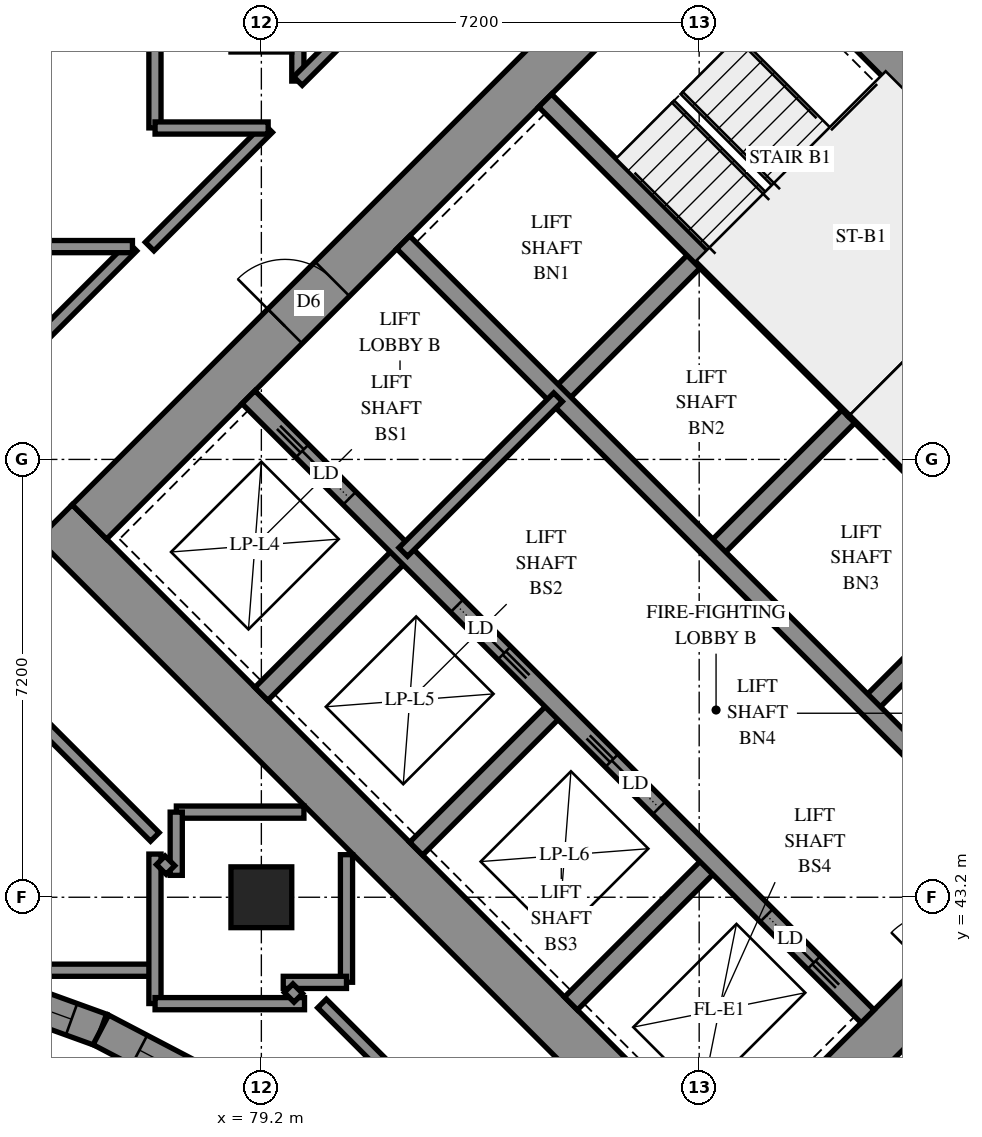
"""IFC4 building model, lengths in metres.
Left out: names, types, materials, properties, quantities, classifications, styles, units other than length and angle.
Written with IfcOpenShell. Run it as: python <this file> out.ifc"""

import sys

from ifc_helpers import new_model, si_unit, direction, frame, frame_2d, origin, origin_2d, place, context, subcontext, project, spatial, polyline, rectangle, outline, extrude, element, fill, save


model = new_model("IFC4")
c1 = context("Model", 3, precision=1e-05, world=origin(), true_north=direction((0.0, 1.0)))
c2 = subcontext(c1, "Body", "Model", "MODEL_VIEW")
j1 = project(units=[si_unit("LENGTHUNIT", "METRE"), si_unit("PLANEANGLEUNIT", "RADIAN")], contexts=[c1])
p1 = place(None, origin())
s1 = spatial("IfcSite", under=j1, at=p1, CompositionType="ELEMENT")
p2 = place(p1, origin())
s2 = spatial("IfcBuilding", under=s1, at=p2, CompositionType="ELEMENT")
p3 = place(p2, frame((0.0, 0.0, 118.6)))
s3 = spatial("IfcBuildingStorey", under=s2, at=p3, CompositionType="ELEMENT", Elevation=118.6)
p4 = place(p3, frame((79.2, 43.2, 0.0), z_axis=(0.0, 0.0, 1.0), x_axis=(1.0, 0.0, 0.0)))
e1 = element("IfcColumn", 1, at=p4, inside=s3, PredefinedType="COLUMN", context=c2, shape_type="SweptSolid", body=[
    extrude(rectangle(XDim=1.0, YDim=1.0, at=origin_2d()), origin(), (0.0, 0.0, 1.0), 3.1),
])
p5 = place(p3, frame((75.806, 49.373, -0.3), z_axis=(0.0, 0.0, 1.0), x_axis=(0.7071067812, -0.7071067812, 0.0)))
e2 = element("IfcWall", 2, at=p5, inside=s3, PredefinedType="SHEAR", context=c2, shape_type="SweptSolid", body=[
    extrude(rectangle(XDim=16.0, YDim=0.8, at=frame_2d((8.0, 0.0))), origin(), (0.0, 0.0, 1.0), 2.7),
])
p6 = place(p3, frame((86.554, 60.121, -0.3), z_axis=(0.0, 0.0, 1.0), x_axis=(0.7071067812, -0.7071067812, 0.0)))
e3 = element("IfcWall", 3, at=p6, inside=s3, PredefinedType="SHEAR", context=c2, shape_type="SweptSolid", body=[
    extrude(rectangle(XDim=16.0, YDim=0.8, at=frame_2d((8.0, 0.0))), origin(), (0.0, 0.0, 1.0), 2.7),
])
p7 = place(p6, frame((10.8, 0.0, 0.3)))
e4 = element("IfcOpeningElement", 4, at=p7, cuts=e3, PredefinedType="OPENING", context=c2, shape_type="SweptSolid", body=[
    extrude(rectangle(XDim=0.8, YDim=2.1, at=frame_2d((0.4, 1.05))), frame((0.0, 0.41, 0.0), z_axis=(0.0, -1.0, 0.0), x_axis=(1.0, 0.0, 0.0)), (0.0, 0.0, 1.0), 0.82),
])
p8 = place(p3, frame((76.372, 49.373, -0.3), z_axis=(0.0, 0.0, 1.0), x_axis=(0.7071067812, 0.7071067812, 0.0)))
e5 = element("IfcWall", 5, at=p8, inside=s3, PredefinedType="SHEAR", context=c2, shape_type="SweptSolid", body=[
    extrude(rectangle(XDim=14.4, YDim=0.8, at=frame_2d((7.2, 0.0))), origin(), (0.0, 0.0, 1.0), 2.7),
])
p9 = place(p8, frame((4.55, 0.0, 0.3)))
e6 = element("IfcOpeningElement", 6, at=p9, cuts=e5, PredefinedType="OPENING", context=c2, shape_type="SweptSolid", body=[
    extrude(rectangle(XDim=1.1, YDim=2.1, at=frame_2d((0.55, 1.05))), frame((0.0, 0.41, 0.0), z_axis=(0.0, -1.0, 0.0), x_axis=(1.0, 0.0, 0.0)), (0.0, 0.0, 1.0), 0.82),
])
p10 = place(p8, frame((11.35, 0.0, 0.3)))
e7 = element("IfcOpeningElement", 7, at=p10, cuts=e5, PredefinedType="OPENING", context=c2, shape_type="SweptSolid", body=[
    extrude(rectangle(XDim=1.1, YDim=2.1, at=frame_2d((0.55, 1.05))), frame((0.0, 0.41, 0.0), z_axis=(0.0, -1.0, 0.0), x_axis=(1.0, 0.0, 0.0)), (0.0, 0.0, 1.0), 0.82),
])
p11 = place(p3, frame((87.12, 38.625, -0.3), z_axis=(0.0, 0.0, 1.0), x_axis=(0.7071067812, 0.7071067812, 0.0)))
e8 = element("IfcWall", 8, at=p11, inside=s3, PredefinedType="SHEAR", context=c2, shape_type="SweptSolid", body=[
    extrude(rectangle(XDim=14.4, YDim=0.8, at=frame_2d((7.2, 0.0))), origin(), (0.0, 0.0, 1.0), 2.7),
])
p12 = place(p11, frame((4.55, 0.0, 0.3)))
e9 = element("IfcOpeningElement", 9, at=p12, cuts=e8, PredefinedType="OPENING", context=c2, shape_type="SweptSolid", body=[
    extrude(rectangle(XDim=1.1, YDim=2.1, at=frame_2d((0.55, 1.05))), frame((0.0, 0.41, 0.0), z_axis=(0.0, -1.0, 0.0), x_axis=(1.0, 0.0, 0.0)), (0.0, 0.0, 1.0), 0.82),
])
p13 = place(p11, frame((11.35, 0.0, 0.3)))
e10 = element("IfcOpeningElement", 10, at=p13, cuts=e8, PredefinedType="OPENING", context=c2, shape_type="SweptSolid", body=[
    extrude(rectangle(XDim=1.1, YDim=2.1, at=frame_2d((0.55, 1.05))), frame((0.0, 0.41, 0.0), z_axis=(0.0, -1.0, 0.0), x_axis=(1.0, 0.0, 0.0)), (0.0, 0.0, 1.0), 0.82),
])
for number, where, z_axis, x_axis in (
    (11, (79.2, 46.544, 0.0), (0.0, 0.0, 1.0), (0.707, 0.707, 0.0)),
    (12, (84.079, 51.423, 0.0), (0.0, 0.0, 1.0), (0.707, 0.707, 0.0)),
):
    element("IfcWall", number, at=place(p3, frame(where, z_axis=z_axis, x_axis=x_axis)), inside=s3, PredefinedType="SOLIDWALL", context=c2, shape_type="SweptSolid", body=[
        extrude(rectangle(XDim=3.3, YDim=0.3, at=frame_2d((1.65, 0.0))), origin(), (0.0, 0.0, 1.0), 3.1),
    ])
p14 = place(p3, frame((81.746, 43.999, 0.0), z_axis=(0.0, 0.0, 1.0), x_axis=(0.7071067812, 0.7071067812, 0.0)))
e13 = element("IfcWall", 13, at=p14, inside=s3, PredefinedType="SOLIDWALL", context=c2, shape_type="SweptSolid", body=[
    extrude(rectangle(XDim=3.3, YDim=0.3, at=frame_2d((1.65, 0.0))), origin(), (0.0, 0.0, 1.0), 3.1),
])
p15 = place(p3, frame((86.625, 48.878, 0.0), z_axis=(0.0, 0.0, 1.0), x_axis=(0.7071067812, 0.7071067812, 0.0)))
e14 = element("IfcWall", 14, at=p15, inside=s3, PredefinedType="SOLIDWALL", context=c2, shape_type="SweptSolid", body=[
    extrude(rectangle(XDim=3.3, YDim=0.3, at=frame_2d((1.65, 0.0))), origin(), (0.0, 0.0, 1.0), 3.1),
])
p16 = place(p3, frame((84.291, 41.453, 0.0), z_axis=(0.0, 0.0, 1.0), x_axis=(0.7071067812, 0.7071067812, 0.0)))
e15 = element("IfcWall", 15, at=p16, inside=s3, PredefinedType="SOLIDWALL", context=c2, shape_type="SweptSolid", body=[
    extrude(rectangle(XDim=3.3, YDim=0.3, at=frame_2d((1.65, 0.0))), origin(), (0.0, 0.0, 1.0), 3.1),
])
p17 = place(p3, frame((89.17, 46.332, 0.0), z_axis=(0.0, 0.0, 1.0), x_axis=(0.7071067812, 0.7071067812, 0.0)))
e16 = element("IfcWall", 16, at=p17, inside=s3, PredefinedType="SOLIDWALL", context=c2, shape_type="SweptSolid", body=[
    extrude(rectangle(XDim=3.3, YDim=0.3, at=frame_2d((1.65, 0.0))), origin(), (0.0, 0.0, 1.0), 3.1),
])
p18 = place(p3, frame((78.988, 51.423, 0.0), z_axis=(0.0, 0.0, 1.0), x_axis=(0.7071067812, -0.7071067812, 0.0)))
e17 = element("IfcWall", 17, at=p18, inside=s3, PredefinedType="SOLIDWALL", context=c2, shape_type="SweptSolid", body=[
    extrude(rectangle(XDim=14.4, YDim=0.3, at=frame_2d((7.2, 0.0))), origin(), (0.0, 0.0, 1.0), 3.1),
])
p19 = place(p18, frame((1.25, 0.0, 0.0)))
e18 = element("IfcOpeningElement", 18, at=p19, cuts=e17, PredefinedType="OPENING", context=c2, shape_type="SweptSolid", body=[
    extrude(rectangle(XDim=1.1, YDim=2.1, at=frame_2d((0.55, 1.05))), frame((0.0, 0.16, 0.0), z_axis=(0.0, -1.0, 0.0), x_axis=(1.0, 0.0, 0.0)), (0.0, 0.0, 1.0), 0.32),
])
p20 = place(p18, frame((4.85, 0.0, 0.0)))
e19 = element("IfcOpeningElement", 19, at=p20, cuts=e17, PredefinedType="OPENING", context=c2, shape_type="SweptSolid", body=[
    extrude(rectangle(XDim=1.1, YDim=2.1, at=frame_2d((0.55, 1.05))), frame((0.0, 0.16, 0.0), z_axis=(0.0, -1.0, 0.0), x_axis=(1.0, 0.0, 0.0)), (0.0, 0.0, 1.0), 0.32),
])
p21 = place(p18, frame((8.45, 0.0, 0.0)))
e20 = element("IfcOpeningElement", 20, at=p21, cuts=e17, PredefinedType="OPENING", context=c2, shape_type="SweptSolid", body=[
    extrude(rectangle(XDim=1.1, YDim=2.1, at=frame_2d((0.55, 1.05))), frame((0.0, 0.16, 0.0), z_axis=(0.0, -1.0, 0.0), x_axis=(1.0, 0.0, 0.0)), (0.0, 0.0, 1.0), 0.32),
])
p22 = place(p18, frame((12.05, 0.0, 0.0)))
e21 = element("IfcOpeningElement", 21, at=p22, cuts=e17, PredefinedType="OPENING", context=c2, shape_type="SweptSolid", body=[
    extrude(rectangle(XDim=1.1, YDim=2.1, at=frame_2d((0.55, 1.05))), frame((0.0, 0.16, 0.0), z_axis=(0.0, -1.0, 0.0), x_axis=(1.0, 0.0, 0.0)), (0.0, 0.0, 1.0), 0.32),
])
p23 = place(p3, frame((81.534, 53.969, 0.0), z_axis=(0.0, 0.0, 1.0), x_axis=(0.707103309, -0.7071102534, 0.0)))
e22 = element("IfcWall", 22, at=p23, inside=s3, PredefinedType="SOLIDWALL", context=c2, shape_type="SweptSolid", body=[
    extrude(rectangle(XDim=14.4, YDim=0.3, at=frame_2d((7.2, 0.0))), origin(), (0.0, 0.0, 1.0), 3.1),
])
p24 = place(p23, frame((12.05, 0.0, 0.0)))
e23 = element("IfcOpeningElement", 23, at=p24, cuts=e22, PredefinedType="OPENING", context=c2, shape_type="SweptSolid", body=[
    extrude(rectangle(XDim=1.1, YDim=2.1, at=frame_2d((0.55, 1.05))), frame((0.0, 0.16, 0.0), z_axis=(0.0, -1.0, 0.0), x_axis=(1.0, 0.0, 0.0)), (0.0, 0.0, 1.0), 0.32),
])
for number, where, z_axis, x_axis in (
    (24, (83.867, 56.302, 0.0), (0.0, 0.0, 1.0), (0.707, -0.707, 0.0)),
    (25, (88.958, 51.211, 0.0), (0.0, 0.0, 1.0), (0.707, -0.707, 0.0)),
):
    element("IfcWall", number, at=place(p3, frame(where, z_axis=z_axis, x_axis=x_axis)), inside=s3, PredefinedType="SOLIDWALL", context=c2, shape_type="SweptSolid", body=[
        extrude(rectangle(XDim=7.2, YDim=0.3, at=frame_2d((3.6, 0.0))), origin(), (0.0, 0.0, 1.0), 3.1),
    ])
p25 = place(p3, frame((88.958, 51.211, 0.0), z_axis=(0.0, 0.0, 1.0), x_axis=(0.7071067812, 0.7071067812, 0.0)))
e26 = element("IfcWall", 26, at=p25, inside=s3, PredefinedType="SOLIDWALL", context=c2, shape_type="SweptSolid", body=[
    extrude(rectangle(XDim=4.2, YDim=0.3, at=frame_2d((2.1, 0.0))), origin(), (0.0, 0.0, 1.0), 3.1),
])
p26 = place(p3, frame((73.067, 42.284, 0.0), z_axis=(0.0, 0.0, 1.0), x_axis=(0.9402976308, -0.3403532953, 0.0)))
e27 = element("IfcWall", 27, at=p26, inside=s3, PredefinedType="SOLIDWALL", context=c2, shape_type="SweptSolid", body=[
    extrude(outline(polyline([(0.075, -0.275), (3.697, -0.275), (3.734, 0.275), (-0.075, 0.275), (0.075, -0.275)])), origin(), (0.0, 0.0, 1.0), 3.1),
])
p27 = place(p26, frame((0.396, 0.0, 0.45)))
e28 = element("IfcOpeningElement", 28, at=p27, cuts=e27, PredefinedType="OPENING", context=c2, shape_type="SweptSolid", body=[
    extrude(rectangle(XDim=1.0, YDim=2.5, at=frame_2d((0.5, 1.25))), frame((0.0, 0.285, 0.0), z_axis=(0.0, -1.0, 0.0), x_axis=(1.0, 0.0, 0.0)), (0.0, 0.0, 1.0), 0.57),
])
p28 = place(p26, frame((2.003, 0.0, 0.5)))
e29 = element("IfcOpeningElement", 29, at=p28, cuts=e27, PredefinedType="OPENING", context=c2, shape_type="SweptSolid", body=[
    extrude(rectangle(XDim=1.2, YDim=2.45, at=frame_2d((0.6, 1.225))), frame((0.0, 0.285, 0.0), z_axis=(0.0, -1.0, 0.0), x_axis=(1.0, 0.0, 0.0)), (0.0, 0.0, 1.0), 0.57),
])
p29 = place(p3, frame((76.561, 41.019, 0.0), z_axis=(0.0, 0.0, 1.0), x_axis=(0.8859460506, -0.4637883089, 0.0)))
e30 = element("IfcWall", 30, at=p29, inside=s3, PredefinedType="SOLIDWALL", context=c2, shape_type="SweptSolid", body=[
    extrude(outline(polyline([(0.019, -0.275), (4.139, -0.275), (4.268, 0.275), (-0.019, 0.275), (0.019, -0.275)])), origin(), (0.0, 0.0, 1.0), 3.1),
])
p30 = place(p29, frame((0.717, 0.0, 0.5)))
e31 = element("IfcOpeningElement", 31, at=p30, cuts=e30, PredefinedType="OPENING", context=c2, shape_type="SweptSolid", body=[
    extrude(rectangle(XDim=1.2, YDim=2.45, at=frame_2d((0.6, 1.225))), frame((0.0, 0.285, 0.0), z_axis=(0.0, -1.0, 0.0), x_axis=(1.0, 0.0, 0.0)), (0.0, 0.0, 1.0), 0.57),
])
p31 = place(p29, frame((2.219, 0.0, 0.5)))
e32 = element("IfcOpeningElement", 32, at=p31, cuts=e30, PredefinedType="OPENING", context=c2, shape_type="SweptSolid", body=[
    extrude(rectangle(XDim=1.2, YDim=2.45, at=frame_2d((0.6, 1.225))), frame((0.0, 0.285, 0.0), z_axis=(0.0, -1.0, 0.0), x_axis=(1.0, 0.0, 0.0)), (0.0, 0.0, 1.0), 0.57),
])
p32 = place(p3, frame((81.534, 48.878, 0.0), z_axis=(0.0, 0.0, 1.0), x_axis=(0.707092892, 0.7071206701, 0.0)))
e33 = element("IfcWall", 33, at=p32, inside=s3, PredefinedType="PARTITIONING", context=c2, shape_type="SweptSolid", body=[
    extrude(rectangle(XDim=3.6, YDim=0.2, at=frame_2d((1.8, 0.0))), origin(), (0.0, 0.0, 1.0), 3.1),
])
p33 = place(p3, frame((86.329, 33.31, 0.0), z_axis=(0.0, 0.0, 1.0), x_axis=(0.7071067812, 0.7071067812, 0.0)))
e34 = element("IfcWall", 34, at=p33, inside=s3, PredefinedType="PARTITIONING", context=c2, shape_type="SweptSolid", body=[
    extrude(rectangle(XDim=11.617, YDim=0.2, at=frame_2d((5.808, 0.0))), origin(), (0.0, 0.0, 1.0), 3.1),
])
p34 = place(p3, frame((86.835, 34.806, 0.0), z_axis=(0.0, 0.0, 1.0), x_axis=(0.7071067812, 0.7071067812, 0.0)))
e35 = element("IfcWall", 35, at=p34, inside=s3, PredefinedType="PARTITIONING", context=c2, shape_type="SweptSolid", body=[
    extrude(rectangle(XDim=10.201, YDim=0.2, at=frame_2d((5.1, 0.0))), origin(), (0.0, 0.0, 1.0), 3.1),
])
p35 = place(p34, frame((8.959, 0.0, 0.0)))
e36 = element("IfcOpeningElement", 36, at=p35, cuts=e35, PredefinedType="OPENING", context=c2, shape_type="SweptSolid", body=[
    extrude(rectangle(XDim=1.0, YDim=2.1, at=frame_2d((0.5, 1.05))), frame((0.0, 0.11, 0.0), z_axis=(0.0, -1.0, 0.0), x_axis=(1.0, 0.0, 0.0)), (0.0, 0.0, 1.0), 0.22),
])
p36 = place(p3, frame((88.889, 61.315, 0.0), z_axis=(0.0, 0.0, 1.0), x_axis=(0.7071067812, -0.7071067812, 0.0)))
e37 = element("IfcWall", 37, at=p36, inside=s3, PredefinedType="PARTITIONING", context=c2, shape_type="SweptSolid", body=[
    extrude(rectangle(XDim=7.187, YDim=0.2, at=frame_2d((3.594, 0.0))), origin(), (0.0, 0.0, 1.0), 3.1),
])
p37 = place(p3, frame((80.197, 41.453, 0.0), z_axis=(0.0, 0.0, 1.0), x_axis=(0.7071067812, -0.7071067812, 0.0)))
e38 = element("IfcWall", 38, at=p37, inside=s3, PredefinedType="PARTITIONING", context=c2, shape_type="SweptSolid", body=[
    extrude(rectangle(XDim=6.488, YDim=0.2, at=frame_2d((3.244, 0.0))), origin(), (0.0, 0.0, 1.0), 3.1),
])
p38 = place(p3, frame((75.102, 51.922, 0.0), z_axis=(0.0, 0.0, 1.0), x_axis=(0.7071067812, 0.7071067812, 0.0)))
e39 = element("IfcWall", 39, at=p38, inside=s3, PredefinedType="PARTITIONING", context=c2, shape_type="SweptSolid", body=[
    extrude(rectangle(XDim=2.797, YDim=0.2, at=frame_2d((1.399, 0.0))), origin(), (0.0, 0.0, 1.0), 3.1),
])
p39 = place(p3, frame((77.45, 55.852, 0.0), z_axis=(0.0, 0.0, 1.0), x_axis=(0.0, 1.0, 0.0)))
e40 = element("IfcWall", 40, at=p39, inside=s3, PredefinedType="PARTITIONING", context=c2, shape_type="SweptSolid", body=[
    extrude(rectangle(XDim=2.766, YDim=0.2, at=frame_2d((1.383, 0.0))), origin(), (0.0, 0.0, 1.0), 3.1),
])
p40 = place(p3, frame((79.8, 56.622, 0.0), z_axis=(0.0, 0.0, 1.0), x_axis=(0.0, 1.0, 0.0)))
e41 = element("IfcWall", 41, at=p40, inside=s3, PredefinedType="PARTITIONING", context=c2, shape_type="SweptSolid", body=[
    extrude(rectangle(XDim=2.758, YDim=0.2, at=frame_2d((1.379, 0.0))), origin(), (0.0, 0.0, 1.0), 3.1),
])
p41 = place(p3, frame((77.363, 53.901, 0.0), z_axis=(0.0, 0.0, 1.0), x_axis=(0.7071067812, 0.7071067812, 0.0)))
e42 = element("IfcWall", 42, at=p41, inside=s3, PredefinedType="PARTITIONING", context=c2, shape_type="SweptSolid", body=[
    extrude(rectangle(XDim=2.755, YDim=0.2, at=frame_2d((1.377, 0.0))), origin(), (0.0, 0.0, 1.0), 3.1),
])
p42 = place(p3, frame((74.709, 42.0, 0.0), z_axis=(0.0, 0.0, 1.0), x_axis=(1.0, 0.0, 0.0)))
e43 = element("IfcWall", 43, at=p42, inside=s3, PredefinedType="PARTITIONING", context=c2, shape_type="SweptSolid", body=[
    extrude(rectangle(XDim=2.741, YDim=0.2, at=frame_2d((1.37, 0.0))), origin(), (0.0, 0.0, 1.0), 3.1),
])
p43 = place(p3, frame((75.598, 46.04, 0.0), z_axis=(0.0, 0.0, 1.0), x_axis=(0.7074891043, -0.7067242512, 0.0)))
e44 = element("IfcWall", 44, at=p43, inside=s3, PredefinedType="PARTITIONING", context=c2, shape_type="SweptSolid", body=[
    extrude(rectangle(XDim=2.615, YDim=0.2, at=frame_2d((1.308, 0.0))), origin(), (0.0, 0.0, 1.0), 3.1),
])
for number, where, z_axis, x_axis in (
    (45, (77.45, 41.452, 0.0), (0.0, 0.0, 1.0), (0.0, 1.0, 0.0)),
    (46, (77.452, 41.45, 0.0), (0.0, 0.0, 1.0), (1.0, 0.0, 0.0)),
):
    element("IfcWall", number, at=place(p3, frame(where, z_axis=z_axis, x_axis=x_axis)), inside=s3, PredefinedType="PARTITIONING", context=c2, shape_type="SweptSolid", body=[
        extrude(rectangle(XDim=2.458, YDim=0.2, at=frame_2d((1.229, 0.0))), origin(), (0.0, 0.0, 1.0), 3.1),
    ])
for number, where, z_axis, x_axis in (
    (47, (77.802, 44.6, 0.0), (0.0, 0.0, 1.0), (1.0, 0.0, 0.0)),
    (48, (80.6, 41.802, 0.0), (0.0, 0.0, 1.0), (0.0, 1.0, 0.0)),
):
    element("IfcWall", number, at=place(p3, frame(where, z_axis=z_axis, x_axis=x_axis)), inside=s3, PredefinedType="PARTITIONING", context=c2, shape_type="SweptSolid", body=[
        extrude(rectangle(XDim=2.098, YDim=0.2, at=frame_2d((1.049, 0.0))), origin(), (0.0, 0.0, 1.0), 3.1),
    ])
p44 = place(p3, frame((75.1, 53.9, 0.0), z_axis=(0.0, 0.0, 1.0), x_axis=(1.0, 0.0, 0.0)))
e49 = element("IfcWall", 49, at=p44, inside=s3, PredefinedType="PARTITIONING", context=c2, shape_type="SweptSolid", body=[
    extrude(rectangle(XDim=1.98, YDim=0.2, at=frame_2d((0.99, 0.0))), origin(), (0.0, 0.0, 1.0), 3.1),
])
p45 = place(p3, frame((79.802, 56.623, 0.0), z_axis=(0.0, 0.0, 1.0), x_axis=(0.7071067812, 0.7071067812, 0.0)))
e50 = element("IfcWall", 50, at=p45, inside=s3, PredefinedType="PARTITIONING", context=c2, shape_type="SweptSolid", body=[
    extrude(rectangle(XDim=1.949, YDim=0.2, at=frame_2d((0.974, 0.0))), origin(), (0.0, 0.0, 1.0), 3.1),
])
p46 = place(p3, frame((77.452, 55.85, 0.0), z_axis=(0.0, 0.0, 1.0), x_axis=(1.0, 0.0, 0.0)))
e51 = element("IfcWall", 51, at=p46, inside=s3, PredefinedType="PARTITIONING", context=c2, shape_type="SweptSolid", body=[
    extrude(rectangle(XDim=1.86, YDim=0.2, at=frame_2d((0.93, 0.0))), origin(), (0.0, 0.0, 1.0), 3.1),
])
for number, where, z_axis, x_axis in (
    (52, (77.8, 43.56, 0.0), (0.0, 0.0, 1.0), (0.0, 1.0, 0.0)),
    (53, (79.56, 41.8, 0.0), (0.0, 0.0, 1.0), (1.0, 0.0, 0.0)),
):
    element("IfcWall", number, at=place(p3, frame(where, z_axis=z_axis, x_axis=x_axis)), inside=s3, PredefinedType="PARTITIONING", context=c2, shape_type="SweptSolid", body=[
        extrude(rectangle(XDim=1.04, YDim=0.2, at=frame_2d((0.52, 0.0))), origin(), (0.0, 0.0, 1.0), 3.1),
    ])
for number, where, z_axis, x_axis in (
    (54, (79.649, 41.705, 0.0), (0.0, 0.0, 1.0), (0.707, -0.707, 0.0)),
    (55, (77.546, 43.808, 0.0), (0.0, 0.0, 1.0), (0.707, -0.707, 0.0)),
):
    element("IfcWall", number, at=place(p3, frame(where, z_axis=z_axis, x_axis=x_axis)), inside=s3, PredefinedType="PARTITIONING", context=c2, shape_type="SweptSolid", body=[
        extrude(rectangle(XDim=0.225, YDim=0.2, at=frame_2d((0.112, 0.0))), origin(), (0.0, 0.0, 1.0), 3.1),
    ])
p47 = place(p30, origin())
e56 = element("IfcWindow", 56, at=p47, inside=s3, PartitioningType="SINGLE_PANEL", PredefinedType="WINDOW", context=c2, shape_type="SweptSolid", body=[
    extrude(rectangle(XDim=1.2, YDim=2.45, at=frame_2d((0.6, 1.225))), frame((0.0, 0.155, 0.0), z_axis=(0.0, -1.0, 0.0), x_axis=(1.0, 0.0, 0.0)), (0.0, 0.0, 1.0), 0.06),
])
fill(e31, e56)
p48 = place(p9, origin())
e57 = element("IfcDoor", 57, at=p48, inside=s3, OperationType="DOUBLE_DOOR_SINGLE_SWING", PredefinedType="DOOR", context=c2, shape_type="SweptSolid", body=[
    extrude(rectangle(XDim=1.1, YDim=2.1, at=frame_2d((0.55, 1.05))), frame((0.0, 0.025, 0.0), z_axis=(0.0, -1.0, 0.0), x_axis=(1.0, 0.0, 0.0)), (0.0, 0.0, 1.0), 0.05),
])
fill(e6, e57)
p49 = place(p19, origin())
e58 = element("IfcDoor", 58, at=p49, inside=s3, OperationType="SLIDING_TO_LEFT", PredefinedType="DOOR", context=c2, shape_type="SweptSolid", body=[
    extrude(rectangle(XDim=1.1, YDim=2.1, at=frame_2d((0.55, 1.05))), frame((0.0, 0.025, 0.0), z_axis=(0.0, -1.0, 0.0), x_axis=(1.0, 0.0, 0.0)), (0.0, 0.0, 1.0), 0.05),
])
fill(e18, e58)
p50 = place(p20, origin())
e59 = element("IfcDoor", 59, at=p50, inside=s3, OperationType="SLIDING_TO_RIGHT", PredefinedType="DOOR", context=c2, shape_type="SweptSolid", body=[
    extrude(rectangle(XDim=1.1, YDim=2.1, at=frame_2d((0.55, 1.05))), frame((0.0, 0.025, 0.0), z_axis=(0.0, -1.0, 0.0), x_axis=(1.0, 0.0, 0.0)), (0.0, 0.0, 1.0), 0.05),
])
fill(e19, e59)
p51 = place(p21, origin())
e60 = element("IfcDoor", 60, at=p51, inside=s3, OperationType="SLIDING_TO_LEFT", PredefinedType="DOOR", context=c2, shape_type="SweptSolid", body=[
    extrude(rectangle(XDim=1.1, YDim=2.1, at=frame_2d((0.55, 1.05))), frame((0.0, 0.025, 0.0), z_axis=(0.0, -1.0, 0.0), x_axis=(1.0, 0.0, 0.0)), (0.0, 0.0, 1.0), 0.05),
])
fill(e20, e60)
p52 = place(p22, origin())
e61 = element("IfcDoor", 61, at=p52, inside=s3, OperationType="SLIDING_TO_RIGHT", PredefinedType="DOOR", context=c2, shape_type="SweptSolid", body=[
    extrude(rectangle(XDim=1.1, YDim=2.1, at=frame_2d((0.55, 1.05))), frame((0.0, 0.025, 0.0), z_axis=(0.0, -1.0, 0.0), x_axis=(1.0, 0.0, 0.0)), (0.0, 0.0, 1.0), 0.05),
])
fill(e21, e61)
p53 = place(p28, origin())
e62 = element("IfcWindow", 62, at=p53, inside=s3, PartitioningType="SINGLE_PANEL", PredefinedType="WINDOW", context=c2, shape_type="SweptSolid", body=[
    extrude(rectangle(XDim=1.2, YDim=2.45, at=frame_2d((0.6, 1.225))), frame((0.0, 0.155, 0.0), z_axis=(0.0, -1.0, 0.0), x_axis=(1.0, 0.0, 0.0)), (0.0, 0.0, 1.0), 0.06),
])
fill(e29, e62)
save(model, sys.argv[1])
